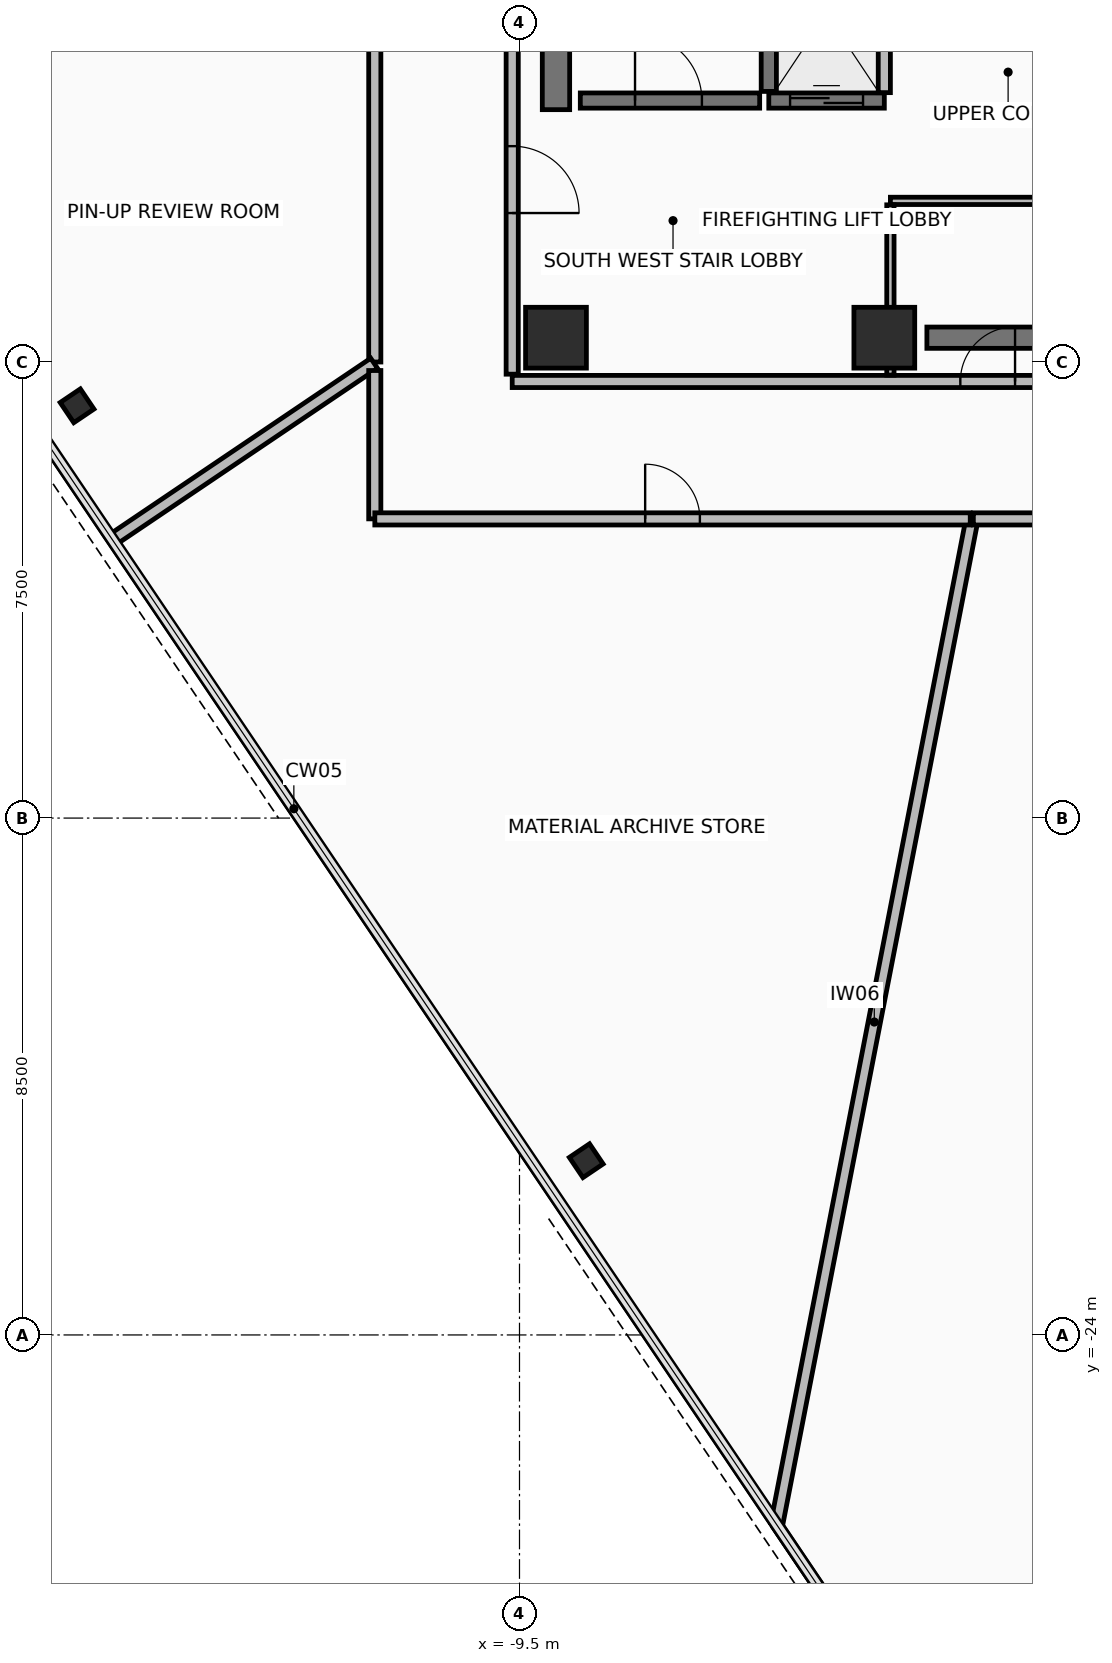
"""IFC4 building model, lengths in metres.
Left out: names, types, materials, properties, quantities, classifications, styles, units other than length and angle.
Written with IfcOpenShell. Run it as: python <this file> out.ifc"""

import sys

from ifc_helpers import new_model, si_unit, direction, frame, frame_2d, origin, origin_2d, place, context, subcontext, project, spatial, rectangle, hollow_rectangle, extrude, element, fill, save


model = new_model("IFC4")
c1 = context("Model", 3, precision=1e-05, world=origin(), true_north=direction((0.0, 1.0)))
c2 = subcontext(c1, "Body", "Model", "MODEL_VIEW")
j1 = project(units=[si_unit("LENGTHUNIT", "METRE"), si_unit("PLANEANGLEUNIT", "RADIAN")], contexts=[c1])
p1 = place(None, origin())
s1 = spatial("IfcSite", under=j1, at=p1, CompositionType="ELEMENT")
p2 = place(p1, origin())
s2 = spatial("IfcBuilding", under=s1, at=p2, CompositionType="ELEMENT")
p3 = place(p2, frame((0.0, 0.0, 264.2)))
s3 = spatial("IfcBuildingStorey", under=s2, at=p3, CompositionType="ELEMENT", Elevation=264.2)
for number, where, z_axis, x_axis in (
    (1, (-8.9, -7.6, 0.0), (0.0, 0.0, 1.0), (1.0, 0.0, 0.0)),
    (2, (-3.5, -7.6, 0.0), (0.0, 0.0, 1.0), (1.0, 0.0, 0.0)),
):
    element("IfcColumn", number, at=place(p3, frame(where, z_axis=z_axis, x_axis=x_axis)), inside=s3, PredefinedType="COLUMN", context=c2, shape_type="SweptSolid", body=[
        extrude(rectangle(XDim=1.0, YDim=1.0, at=origin_2d()), origin(), (0.0, 0.0, 1.0), 3.6),
    ])
for number, where, z_axis, x_axis in (
    (3, (-16.776, -8.72, 0.0), (0.0, 0.0, 1.0), (-0.559, 0.829, 0.0)),
    (4, (-8.402, -21.135, 0.0), (0.0, 0.0, 1.0), (-0.559, 0.829, 0.0)),
):
    element("IfcColumn", number, at=place(p3, frame(where, z_axis=z_axis, x_axis=x_axis)), inside=s3, PredefinedType="COLUMN", context=c2, shape_type="SweptSolid", body=[
        extrude(hollow_rectangle(XDim=0.4, YDim=0.4, WallThickness=0.025, at=origin_2d()), origin(), (0.0, 0.0, 1.0), 3.6),
    ])
p4 = place(p3, frame((-2.8, -7.6, 0.0), z_axis=(0.0, 0.0, 1.0), x_axis=(1.0, 0.0, 0.0)))
e5 = element("IfcWall", 5, at=p4, inside=s3, PredefinedType="SHEAR", context=c2, shape_type="SweptSolid", body=[
    extrude(rectangle(XDim=5.38, YDim=0.35, at=frame_2d((2.69, 0.0))), origin(), (0.0, 0.0, 1.0), 3.42),
])
p5 = place(p3, frame((-8.9, -3.85, 0.0), z_axis=(0.0, 0.0, 1.0), x_axis=(0.0, 1.0, 0.0)))
e6 = element("IfcWall", 6, at=p5, inside=s3, PredefinedType="SHEAR", context=c2, shape_type="SweptSolid", body=[
    extrude(rectangle(XDim=10.7, YDim=0.45, at=frame_2d((5.35, 0.0))), origin(), (0.0, 0.0, 1.0), 3.42),
])
p6 = place(p3, frame((-9.62, -8.32, 0.0), z_axis=(0.0, 0.0, 1.0), x_axis=(1.0, 0.0, 0.0)))
e7 = element("IfcWall", 7, at=p6, inside=s3, PredefinedType="PARTITIONING", context=c2, shape_type="SweptSolid", body=[
    extrude(rectangle(XDim=19.24, YDim=0.2, at=frame_2d((9.62, 0.0))), origin(), (0.0, 0.0, 1.0), 2.915),
])
p7 = place(p6, frame((7.37, 0.0, 0.0)))
e8 = element("IfcOpeningElement", 8, at=p7, cuts=e7, PredefinedType="OPENING", context=c2, shape_type="SweptSolid", body=[
    extrude(rectangle(XDim=0.9, YDim=2.1, at=frame_2d((0.45, 1.05))), frame((0.0, 0.11, 0.0), z_axis=(0.0, -1.0, 0.0), x_axis=(1.0, 0.0, 0.0)), (0.0, 0.0, 1.0), 0.22),
])
p8 = place(p6, frame((10.77, 0.0, 0.0)))
e9 = element("IfcOpeningElement", 9, at=p8, cuts=e7, PredefinedType="OPENING", context=c2, shape_type="SweptSolid", body=[
    extrude(rectangle(XDim=0.9, YDim=2.1, at=frame_2d((0.45, 1.05))), frame((0.0, 0.11, 0.0), z_axis=(0.0, -1.0, 0.0), x_axis=(1.0, 0.0, 0.0)), (0.0, 0.0, 1.0), 0.22),
])
p9 = place(p6, frame((13.97, 0.0, 0.0)))
e10 = element("IfcOpeningElement", 10, at=p9, cuts=e7, PredefinedType="OPENING", context=c2, shape_type="SweptSolid", body=[
    extrude(rectangle(XDim=0.9, YDim=2.1, at=frame_2d((0.45, 1.05))), frame((0.0, 0.11, 0.0), z_axis=(0.0, -1.0, 0.0), x_axis=(1.0, 0.0, 0.0)), (0.0, 0.0, 1.0), 0.22),
])
p10 = place(p3, frame((-9.62, 8.2, 0.0), z_axis=(0.0, 0.0, 1.0), x_axis=(0.0, -1.0, 0.0)))
e11 = element("IfcWall", 11, at=p10, inside=s3, PredefinedType="PARTITIONING", context=c2, shape_type="SweptSolid", body=[
    extrude(rectangle(XDim=16.4, YDim=0.2, at=frame_2d((8.2, 0.0))), origin(), (0.0, 0.0, 1.0), 2.765),
])
p11 = place(p10, frame((12.65, 0.0, 0.0)))
e12 = element("IfcOpeningElement", 12, at=p11, cuts=e11, PredefinedType="OPENING", context=c2, shape_type="SweptSolid", body=[
    extrude(rectangle(XDim=1.1, YDim=2.15, at=frame_2d((0.55, 1.075))), frame((0.0, 0.11, 0.0), z_axis=(0.0, -1.0, 0.0), x_axis=(1.0, 0.0, 0.0)), (0.0, 0.0, 1.0), 0.22),
])
p12 = place(p3, frame((-5.4, -3.55, 0.0), z_axis=(0.0, 0.0, 1.0), x_axis=(0.0, 1.0, 0.0)))
e13 = element("IfcWall", 13, at=p12, inside=s3, PredefinedType="SHEAR", context=c2, shape_type="SweptSolid", body=[
    extrude(rectangle(XDim=7.3, YDim=0.25, at=frame_2d((3.65, 0.0))), origin(), (0.0, 0.0, 1.0), 3.42),
])
p13 = place(p3, frame((-8.5, -3.7, 0.0), z_axis=(0.0, 0.0, 1.0), x_axis=(1.0, 0.0, 0.0)))
e14 = element("IfcWall", 14, at=p13, inside=s3, PredefinedType="SHEAR", context=c2, shape_type="SweptSolid", body=[
    extrude(rectangle(XDim=2.95, YDim=0.25, at=frame_2d((1.475, 0.0))), origin(), (0.0, 0.0, 1.0), 3.42),
])
p14 = place(p13, frame((0.9, 0.0, 0.0)))
e15 = element("IfcOpeningElement", 15, at=p14, cuts=e14, PredefinedType="OPENING", context=c2, shape_type="SweptSolid", body=[
    extrude(rectangle(XDim=1.1, YDim=2.15, at=frame_2d((0.55, 1.075))), frame((0.0, 0.135, 0.0), z_axis=(0.0, -1.0, 0.0), x_axis=(1.0, 0.0, 0.0)), (0.0, 0.0, 1.0), 0.27),
])
p15 = place(p3, frame((-5.4, -3.7, 0.0), z_axis=(0.0, 0.0, 1.0), x_axis=(1.0, 0.0, 0.0)))
e16 = element("IfcWall", 16, at=p15, inside=s3, PredefinedType="SHEAR", context=c2, shape_type="SweptSolid", body=[
    extrude(rectangle(XDim=1.9, YDim=0.25, at=frame_2d((0.95, 0.0))), origin(), (0.0, 0.0, 1.0), 3.42),
])
p16 = place(p15, frame((0.35, 0.0, 0.0)))
e17 = element("IfcOpeningElement", 17, at=p16, cuts=e16, PredefinedType="OPENING", context=c2, shape_type="SweptSolid", body=[
    extrude(rectangle(XDim=1.2, YDim=2.2, at=frame_2d((0.6, 1.1))), frame((0.0, 0.135, 0.0), z_axis=(0.0, -1.0, 0.0), x_axis=(1.0, 0.0, 0.0)), (0.0, 0.0, 1.0), 0.27),
])
p17 = place(p3, frame((-3.5, -3.57, 0.0), z_axis=(0.0, 0.0, 1.0), x_axis=(0.0, 1.0, 0.0)))
e18 = element("IfcWall", 18, at=p17, inside=s3, PredefinedType="PARTITIONING", context=c2, shape_type="SweptSolid", body=[
    extrude(rectangle(XDim=2.615, YDim=0.2, at=frame_2d((1.308, 0.0))), origin(), (0.0, 0.0, 1.0), 3.42),
])
p18 = place(p3, frame((-0.265, -5.35, 0.0), z_axis=(0.0, 0.0, 1.0), x_axis=(-1.0, 0.0, 0.0)))
e19 = element("IfcWall", 19, at=p18, inside=s3, PredefinedType="PARTITIONING", context=c2, shape_type="SweptSolid", body=[
    extrude(rectangle(XDim=3.135, YDim=0.12, at=frame_2d((1.567, 0.0))), origin(), (0.0, 0.0, 1.0), 2.715),
])
p19 = place(p3, frame((-3.4, -5.415, 0.0), z_axis=(0.0, 0.0, 1.0), x_axis=(0.0, -1.0, 0.0)))
e20 = element("IfcWall", 20, at=p19, inside=s3, PredefinedType="PARTITIONING", context=c2, shape_type="SweptSolid", body=[
    extrude(rectangle(XDim=2.8, YDim=0.12, at=frame_2d((1.4, 0.0))), origin(), (0.0, 0.0, 1.0), 2.715),
])
p20 = place(p3, frame((-0.024, -34.897, 0.0), z_axis=(0.0, 0.0, 1.0), x_axis=(-0.559200376751, 0.829032531715, 0.0)))
e21 = element("IfcWall", 21, at=p20, inside=s3, PredefinedType="PARTITIONING", context=c2, shape_type="SweptSolid", body=[
    extrude(rectangle(XDim=9.373, YDim=0.15, at=frame_2d((4.687, 0.0))), origin(), (0.0, 0.0, 1.0), 3.42),
])
p21 = place(p3, frame((-5.269, -27.108, 0.0), z_axis=(0.0, 0.0, 1.0), x_axis=(0.190805932, 0.981627778903, 0.0)))
e22 = element("IfcWall", 22, at=p21, inside=s3, PredefinedType="PARTITIONING", context=c2, shape_type="SweptSolid", body=[
    extrude(rectangle(XDim=16.817, YDim=0.2, at=frame_2d((8.408, 0.0))), origin(), (0.0, 0.0, 1.0), 2.765),
])
p22 = place(p3, frame((-2.036, -10.58, 0.0), z_axis=(0.0, 0.0, 1.0), x_axis=(1.0, 0.0, 0.0)))
e23 = element("IfcWall", 23, at=p22, inside=s3, PredefinedType="PARTITIONING", context=c2, shape_type="SweptSolid", body=[
    extrude(rectangle(XDim=9.159, YDim=0.2, at=frame_2d((4.58, 0.0))), origin(), (0.0, 0.0, 1.0), 3.42),
])
p23 = place(p22, frame((4.154, 0.0, 0.0)))
e24 = element("IfcOpeningElement", 24, at=p23, cuts=e23, PredefinedType="OPENING", context=c2, shape_type="SweptSolid", body=[
    extrude(rectangle(XDim=0.85, YDim=2.1, at=frame_2d((0.425, 1.05))), frame((0.0, 0.11, 0.0), z_axis=(0.0, -1.0, 0.0), x_axis=(1.0, 0.0, 0.0)), (0.0, 0.0, 1.0), 0.22),
])
p24 = place(p3, frame((-11.88, -1.925, 0.0), z_axis=(0.0, 0.0, 1.0), x_axis=(0.0, -1.0, 0.0)))
e25 = element("IfcWall", 25, at=p24, inside=s3, PredefinedType="PARTITIONING", context=c2, shape_type="SweptSolid", body=[
    extrude(rectangle(XDim=6.075, YDim=0.2, at=frame_2d((3.038, 0.0))), origin(), (0.0, 0.0, 1.0), 2.915),
])
p25 = place(p3, frame((-11.891, -8.021, 0.0), z_axis=(0.0, 0.0, 1.0), x_axis=(-0.829020667263, -0.55921796578, 0.0)))
e26 = element("IfcWall", 26, at=p25, inside=s3, PredefinedType="PARTITIONING", context=c2, shape_type="SweptSolid", body=[
    extrude(rectangle(XDim=5.166, YDim=0.2, at=frame_2d((2.583, 0.0))), origin(), (0.0, 0.0, 1.0), 2.765),
])
p26 = place(p3, frame((-11.88, -8.14, 0.0), z_axis=(0.0, 0.0, 1.0), x_axis=(0.0, -1.0, 0.0)))
e27 = element("IfcWall", 27, at=p26, inside=s3, PredefinedType="PARTITIONING", context=c2, shape_type="SweptSolid", body=[
    extrude(rectangle(XDim=2.439, YDim=0.2, at=frame_2d((1.22, 0.0))), origin(), (0.0, 0.0, 1.0), 2.915),
])
p27 = place(p3, frame((-11.879, -10.58, 0.0), z_axis=(0.0, 0.0, 1.0), x_axis=(1.0, 0.0, 0.0)))
e28 = element("IfcWall", 28, at=p27, inside=s3, PredefinedType="PARTITIONING", context=c2, shape_type="SweptSolid", body=[
    extrude(rectangle(XDim=9.792, YDim=0.2, at=frame_2d((4.896, 0.0))), origin(), (0.0, 0.0, 1.0), 2.915),
])
p28 = place(p27, frame((4.446, 0.0, 0.0)))
e29 = element("IfcOpeningElement", 29, at=p28, cuts=e28, PredefinedType="OPENING", context=c2, shape_type="SweptSolid", body=[
    extrude(rectangle(XDim=0.9, YDim=2.1, at=frame_2d((0.45, 1.05))), frame((0.0, 0.11, 0.0), z_axis=(0.0, -1.0, 0.0), x_axis=(1.0, 0.0, 0.0)), (0.0, 0.0, 1.0), 0.22),
])
p29 = place(p11, frame((1.1, 0.0, 0.0), z_axis=(0.0, 0.0, 1.0), x_axis=(-1.0, 0.0, 0.0)))
e30 = element("IfcDoor", 30, at=p29, inside=s3, OperationType="SINGLE_SWING_LEFT", PredefinedType="DOOR", context=c2, shape_type="SweptSolid", body=[
    extrude(rectangle(XDim=1.1, YDim=2.15, at=frame_2d((0.55, 1.075))), frame((0.0, 0.025, 0.0), z_axis=(0.0, -1.0, 0.0), x_axis=(1.0, 0.0, 0.0)), (0.0, 0.0, 1.0), 0.05),
])
fill(e12, e30)
p30 = place(p14, origin())
e31 = element("IfcDoor", 31, at=p30, inside=s3, OperationType="SINGLE_SWING_LEFT", PredefinedType="DOOR", context=c2, shape_type="SweptSolid", body=[
    extrude(rectangle(XDim=1.1, YDim=2.15, at=frame_2d((0.55, 1.075))), frame((0.0, 0.025, 0.0), z_axis=(0.0, -1.0, 0.0), x_axis=(1.0, 0.0, 0.0)), (0.0, 0.0, 1.0), 0.05),
])
fill(e15, e31)
p31 = place(p16, origin())
e32 = element("IfcDoor", 32, at=p31, inside=s3, OperationType="SLIDING_TO_RIGHT", PredefinedType="DOOR", context=c2, shape_type="SweptSolid", body=[
    extrude(rectangle(XDim=1.2, YDim=2.2, at=frame_2d((0.6, 1.1))), frame((0.0, 0.025, 0.0), z_axis=(0.0, -1.0, 0.0), x_axis=(1.0, 0.0, 0.0)), (0.0, 0.0, 1.0), 0.05),
])
fill(e17, e32)
p32 = place(p7, frame((0.9, 0.0, 0.0), z_axis=(0.0, 0.0, 1.0), x_axis=(-1.0, 0.0, 0.0)))
e33 = element("IfcDoor", 33, at=p32, inside=s3, OperationType="SINGLE_SWING_LEFT", PredefinedType="DOOR", context=c2, shape_type="SweptSolid", body=[
    extrude(rectangle(XDim=0.9, YDim=2.1, at=frame_2d((0.45, 1.05))), frame((0.0, 0.025, 0.0), z_axis=(0.0, -1.0, 0.0), x_axis=(1.0, 0.0, 0.0)), (0.0, 0.0, 1.0), 0.05),
])
fill(e8, e33)
p33 = place(p28, origin())
e34 = element("IfcDoor", 34, at=p33, inside=s3, OperationType="SINGLE_SWING_LEFT", PredefinedType="DOOR", context=c2, shape_type="SweptSolid", body=[
    extrude(rectangle(XDim=0.9, YDim=2.1, at=frame_2d((0.45, 1.05))), frame((0.0, 0.025, 0.0), z_axis=(0.0, -1.0, 0.0), x_axis=(1.0, 0.0, 0.0)), (0.0, 0.0, 1.0), 0.05),
])
fill(e29, e34)
save(model, sys.argv[1])
